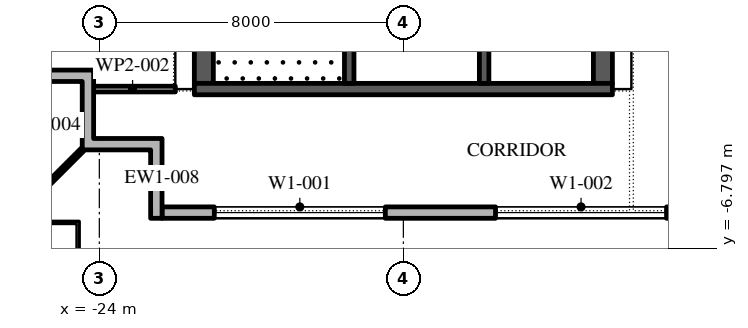
"""IFC4 building model, lengths in metres.
Left out: names, types, materials, properties, quantities, classifications, styles, units other than length and angle.
Written with IfcOpenShell. Run it as: python <this file> out.ifc"""

import sys

from ifc_helpers import new_model, si_unit, direction, frame, frame_2d, origin, place, context, subcontext, project, spatial, polyline, rectangle, outline, extrude, element, fill, save


model = new_model("IFC4")
c1 = context("Model", 3, precision=1e-05, world=origin(), true_north=direction((0.0, 1.0)))
c2 = subcontext(c1, "Body", "Model", "MODEL_VIEW")
j1 = project(units=[si_unit("LENGTHUNIT", "METRE"), si_unit("PLANEANGLEUNIT", "RADIAN")], contexts=[c1])
p1 = place(None, origin())
s1 = spatial("IfcSite", under=j1, at=p1, CompositionType="ELEMENT")
p2 = place(p1, origin())
s2 = spatial("IfcBuilding", under=s1, at=p2, CompositionType="ELEMENT")
p3 = place(p2, frame((0.0, 0.0, 317.4)))
s3 = spatial("IfcBuildingStorey", under=s2, at=p3, CompositionType="ELEMENT", Elevation=317.4)
p4 = place(p3, frame((-22.35, -5.85, 0.0), z_axis=(0.0, 0.0, 1.0), x_axis=(1.0, 0.0, 0.0)))
e1 = element("IfcWall", 1, at=p4, inside=s3, PredefinedType="STANDARD", context=c2, shape_type="SweptSolid", body=[
    extrude(rectangle(XDim=45.0, YDim=0.3, at=frame_2d((22.5, 0.0))), origin(), (0.0, 0.0, 1.0), 4.0),
])
p5 = place(p4, frame((1.375, 0.0, 0.45)))
e2 = element("IfcOpeningElement", 2, at=p5, cuts=e1, PredefinedType="OPENING", context=c2, shape_type="SweptSolid", body=[
    extrude(rectangle(XDim=4.5, YDim=3.05, at=frame_2d((2.25, 1.525))), frame((0.0, 0.16, 0.0), z_axis=(0.0, -1.0, 0.0), x_axis=(1.0, 0.0, 0.0)), (0.0, 0.0, 1.0), 0.32),
])
p6 = place(p4, frame((8.775, 0.0, 0.45)))
e3 = element("IfcOpeningElement", 3, at=p6, cuts=e1, PredefinedType="OPENING", context=c2, shape_type="SweptSolid", body=[
    extrude(rectangle(XDim=4.5, YDim=3.05, at=frame_2d((2.25, 1.525))), frame((0.0, 0.16, 0.0), z_axis=(0.0, -1.0, 0.0), x_axis=(1.0, 0.0, 0.0)), (0.0, 0.0, 1.0), 0.32),
])
p7 = place(p4, frame((17.375, 0.0, 0.0)))
e4 = element("IfcOpeningElement", 4, at=p7, cuts=e1, PredefinedType="OPENING", context=c2, shape_type="SweptSolid", body=[
    extrude(rectangle(XDim=2.4, YDim=3.5, at=frame_2d((1.2, 1.75))), frame((0.0, 0.16, 0.0), z_axis=(0.0, -1.0, 0.0), x_axis=(1.0, 0.0, 0.0)), (0.0, 0.0, 1.0), 0.32),
])
p8 = place(p4, frame((23.875, 0.0, 0.45)))
e5 = element("IfcOpeningElement", 5, at=p8, cuts=e1, PredefinedType="OPENING", context=c2, shape_type="SweptSolid", body=[
    extrude(rectangle(XDim=4.5, YDim=3.05, at=frame_2d((2.25, 1.525))), frame((0.0, 0.16, 0.0), z_axis=(0.0, -1.0, 0.0), x_axis=(1.0, 0.0, 0.0)), (0.0, 0.0, 1.0), 0.32),
])
p9 = place(p4, frame((31.425, 0.0, 0.45)))
e6 = element("IfcOpeningElement", 6, at=p9, cuts=e1, PredefinedType="OPENING", context=c2, shape_type="SweptSolid", body=[
    extrude(rectangle(XDim=4.5, YDim=3.05, at=frame_2d((2.25, 1.525))), frame((0.0, 0.16, 0.0), z_axis=(0.0, -1.0, 0.0), x_axis=(1.0, 0.0, 0.0)), (0.0, 0.0, 1.0), 0.32),
])
p10 = place(p4, frame((38.975, 0.0, 0.45)))
e7 = element("IfcOpeningElement", 7, at=p10, cuts=e1, PredefinedType="OPENING", context=c2, shape_type="SweptSolid", body=[
    extrude(rectangle(XDim=4.5, YDim=3.05, at=frame_2d((2.25, 1.525))), frame((0.0, 0.16, 0.0), z_axis=(0.0, -1.0, 0.0), x_axis=(1.0, 0.0, 0.0)), (0.0, 0.0, 1.0), 0.32),
])
p11 = place(p3, origin())
e8 = element("IfcWall", 8, at=p11, inside=s3, PredefinedType="STANDARD", context=c2, shape_type="SweptSolid", body=[
    extrude(outline(polyline([(-22.65, -4.2), (-24.45, -4.2), (-24.45, -2.4), (-25.95, -2.4), (-25.95, -2.1), (-24.15, -2.1), (-24.15, -3.9), (-22.35, -3.9), (-22.35, -6.0), (-22.65, -6.0), (-22.65, -4.2)])), origin(), (0.0, 0.0, 1.0), 4.0),
])
p12 = place(p3, frame((-24.45, -4.2, -0.05), z_axis=(0.0, 0.0, 1.0), x_axis=(-0.707106781187, -0.707106781187, 0.0)))
e9 = element("IfcWall", 9, at=p12, inside=s3, PredefinedType="STANDARD", context=c2, shape_type="SweptSolid", body=[
    extrude(rectangle(XDim=2.667, YDim=0.1, at=frame_2d((1.333, 0.0))), origin(), (0.0, 0.0, 1.0), 4.05),
])
p13 = place(p3, frame((-21.25, -2.45, 0.0), z_axis=(0.0, 0.0, 1.0), x_axis=(0.0, 1.0, 0.0)))
e10 = element("IfcWall", 10, at=p13, inside=s3, PredefinedType="SHEAR", context=c2, shape_type="SweptSolid", body=[
    extrude(rectangle(XDim=27.9, YDim=0.5, at=frame_2d((13.95, 0.0))), origin(), (0.0, 0.0, 1.0), 4.0),
])
p14 = place(p13, frame((5.05, 0.0, 0.0)))
e11 = element("IfcOpeningElement", 11, at=p14, cuts=e10, PredefinedType="OPENING", context=c2, shape_type="SweptSolid", body=[
    extrude(rectangle(XDim=1.2, YDim=2.1, at=frame_2d((0.6, 1.05))), frame((0.0, 0.26, 0.0), z_axis=(0.0, -1.0, 0.0), x_axis=(1.0, 0.0, 0.0)), (0.0, 0.0, 1.0), 0.52),
])
p15 = place(p13, frame((21.65, 0.0, 0.0)))
e12 = element("IfcOpeningElement", 12, at=p15, cuts=e10, PredefinedType="OPENING", context=c2, shape_type="SweptSolid", body=[
    extrude(rectangle(XDim=1.2, YDim=2.1, at=frame_2d((0.6, 1.05))), frame((0.0, 0.26, 0.0), z_axis=(0.0, -1.0, 0.0), x_axis=(1.0, 0.0, 0.0)), (0.0, 0.0, 1.0), 0.52),
])
p16 = place(p3, frame((-10.75, -2.45, 0.0), z_axis=(0.0, 0.0, 1.0), x_axis=(0.0, 1.0, 0.0)))
e13 = element("IfcWall", 13, at=p16, inside=s3, PredefinedType="SHEAR", context=c2, shape_type="SweptSolid", body=[
    extrude(rectangle(XDim=27.9, YDim=0.5, at=frame_2d((13.95, 0.0))), origin(), (0.0, 0.0, 1.0), 4.0),
])
p17 = place(p16, frame((23.65, 0.0, 0.0)))
e14 = element("IfcOpeningElement", 14, at=p17, cuts=e13, PredefinedType="OPENING", context=c2, shape_type="SweptSolid", body=[
    extrude(rectangle(XDim=2.4, YDim=2.1, at=frame_2d((1.2, 1.05))), frame((0.0, 0.26, 0.0), z_axis=(0.0, -1.0, 0.0), x_axis=(1.0, 0.0, 0.0)), (0.0, 0.0, 1.0), 0.52),
])
p18 = place(p16, frame((1.087, 0.0, 0.0)))
e15 = element("IfcOpeningElement", 15, at=p18, cuts=e13, PredefinedType="OPENING", context=c2, shape_type="SweptSolid", body=[
    extrude(rectangle(XDim=0.9, YDim=2.1, at=frame_2d((0.45, 1.05))), frame((0.0, 0.26, 0.0), z_axis=(0.0, -1.0, 0.0), x_axis=(1.0, 0.0, 0.0)), (0.0, 0.0, 1.0), 0.52),
])
p19 = place(p16, frame((4.262, 0.0, 0.0)))
e16 = element("IfcOpeningElement", 16, at=p19, cuts=e13, PredefinedType="OPENING", context=c2, shape_type="SweptSolid", body=[
    extrude(rectangle(XDim=1.0, YDim=2.1, at=frame_2d((0.5, 1.05))), frame((0.0, 0.26, 0.0), z_axis=(0.0, -1.0, 0.0), x_axis=(1.0, 0.0, 0.0)), (0.0, 0.0, 1.0), 0.52),
])
p20 = place(p3, frame((-21.5, -2.6, 0.0), z_axis=(0.0, 0.0, 1.0), x_axis=(1.0, 0.0, 0.0)))
e17 = element("IfcWall", 17, at=p20, inside=s3, PredefinedType="SHEAR", context=c2, shape_type="SweptSolid", body=[
    extrude(rectangle(XDim=11.0, YDim=0.3, at=frame_2d((5.5, 0.0))), origin(), (0.0, 0.0, 1.0), 4.0),
])
p21 = place(p3, frame((-17.425, -2.45, 0.0), z_axis=(0.0, 0.0, 1.0), x_axis=(0.0, 1.0, 0.0)))
e18 = element("IfcWall", 18, at=p21, inside=s3, PredefinedType="SHEAR", context=c2, shape_type="SweptSolid", body=[
    extrude(rectangle(XDim=6.3, YDim=0.25, at=frame_2d((3.15, 0.0))), origin(), (0.0, 0.0, 1.0), 4.0),
])
p22 = place(p21, frame((5.05, 0.0, 0.0)))
e19 = element("IfcOpeningElement", 19, at=p22, cuts=e18, PredefinedType="OPENING", context=c2, shape_type="SweptSolid", body=[
    extrude(rectangle(XDim=1.2, YDim=2.1, at=frame_2d((0.6, 1.05))), frame((0.0, 0.135, 0.0), z_axis=(0.0, -1.0, 0.0), x_axis=(1.0, 0.0, 0.0)), (0.0, 0.0, 1.0), 0.27),
])
p23 = place(p3, frame((-13.875, -2.45, 0.0), z_axis=(0.0, 0.0, 1.0), x_axis=(0.0, 1.0, 0.0)))
e20 = element("IfcWall", 20, at=p23, inside=s3, PredefinedType="SHEAR", context=c2, shape_type="SweptSolid", body=[
    extrude(rectangle(XDim=21.3, YDim=0.25, at=frame_2d((10.65, 0.0))), origin(), (0.0, 0.0, 1.0), 4.0),
])
p24 = place(p23, frame((11.357, 0.0, 0.0)))
e21 = element("IfcOpeningElement", 21, at=p24, cuts=e20, PredefinedType="OPENING", context=c2, shape_type="SweptSolid", body=[
    extrude(rectangle(XDim=0.9, YDim=2.1, at=frame_2d((0.45, 1.05))), frame((0.0, 0.135, 0.0), z_axis=(0.0, -1.0, 0.0), x_axis=(1.0, 0.0, 0.0)), (0.0, 0.0, 1.0), 0.27),
])
p25 = place(p23, frame((6.971, 0.0, 0.0)))
e22 = element("IfcOpeningElement", 22, at=p25, cuts=e20, PredefinedType="OPENING", context=c2, shape_type="SweptSolid", body=[
    extrude(rectangle(XDim=1.1, YDim=2.1, at=frame_2d((0.55, 1.05))), frame((0.0, 0.135, 0.0), z_axis=(0.0, -1.0, 0.0), x_axis=(1.0, 0.0, 0.0)), (0.0, 0.0, 1.0), 0.27),
])
p26 = place(p23, frame((15.543, 0.0, 0.0)))
e23 = element("IfcOpeningElement", 23, at=p26, cuts=e20, PredefinedType="OPENING", context=c2, shape_type="SweptSolid", body=[
    extrude(rectangle(XDim=1.1, YDim=2.1, at=frame_2d((0.55, 1.05))), frame((0.0, 0.135, 0.0), z_axis=(0.0, -1.0, 0.0), x_axis=(1.0, 0.0, 0.0)), (0.0, 0.0, 1.0), 0.27),
])
p27 = place(p23, frame((17.686, 0.0, 0.0)))
e24 = element("IfcOpeningElement", 24, at=p27, cuts=e20, PredefinedType="OPENING", context=c2, shape_type="SweptSolid", body=[
    extrude(rectangle(XDim=1.1, YDim=2.1, at=frame_2d((0.55, 1.05))), frame((0.0, 0.135, 0.0), z_axis=(0.0, -1.0, 0.0), x_axis=(1.0, 0.0, 0.0)), (0.0, 0.0, 1.0), 0.27),
])
p28 = place(p23, frame((19.829, 0.0, 0.0)))
e25 = element("IfcOpeningElement", 25, at=p28, cuts=e20, PredefinedType="OPENING", context=c2, shape_type="SweptSolid", body=[
    extrude(rectangle(XDim=1.1, YDim=2.1, at=frame_2d((0.55, 1.05))), frame((0.0, 0.135, 0.0), z_axis=(0.0, -1.0, 0.0), x_axis=(1.0, 0.0, 0.0)), (0.0, 0.0, 1.0), 0.27),
])
p29 = place(p3, frame((-24.25, -2.6, 0.0), z_axis=(0.0, 0.0, 1.0), x_axis=(1.0, 0.0, 0.0)))
e26 = element("IfcWall", 26, at=p29, inside=s3, PredefinedType="PARTITIONING", context=c2, shape_type="SweptSolid", body=[
    extrude(rectangle(XDim=2.25, YDim=0.15, at=frame_2d((1.125, 0.0))), origin(), (0.0, 0.0, 1.0), 4.0),
])
p30 = place(p5, origin())
e27 = element("IfcWindow", 27, at=p30, inside=s3, PartitioningType="DOUBLE_PANEL_VERTICAL", PredefinedType="WINDOW", context=c2, shape_type="SweptSolid", body=[
    extrude(rectangle(XDim=4.5, YDim=3.05, at=frame_2d((2.25, 1.525))), frame((0.0, 0.03, 0.0), z_axis=(0.0, -1.0, 0.0), x_axis=(1.0, 0.0, 0.0)), (0.0, 0.0, 1.0), 0.06),
])
fill(e2, e27)
p31 = place(p6, origin())
e28 = element("IfcWindow", 28, at=p31, inside=s3, PartitioningType="DOUBLE_PANEL_VERTICAL", PredefinedType="WINDOW", context=c2, shape_type="SweptSolid", body=[
    extrude(rectangle(XDim=4.5, YDim=3.05, at=frame_2d((2.25, 1.525))), frame((0.0, 0.03, 0.0), z_axis=(0.0, -1.0, 0.0), x_axis=(1.0, 0.0, 0.0)), (0.0, 0.0, 1.0), 0.06),
])
fill(e3, e28)
save(model, sys.argv[1])
